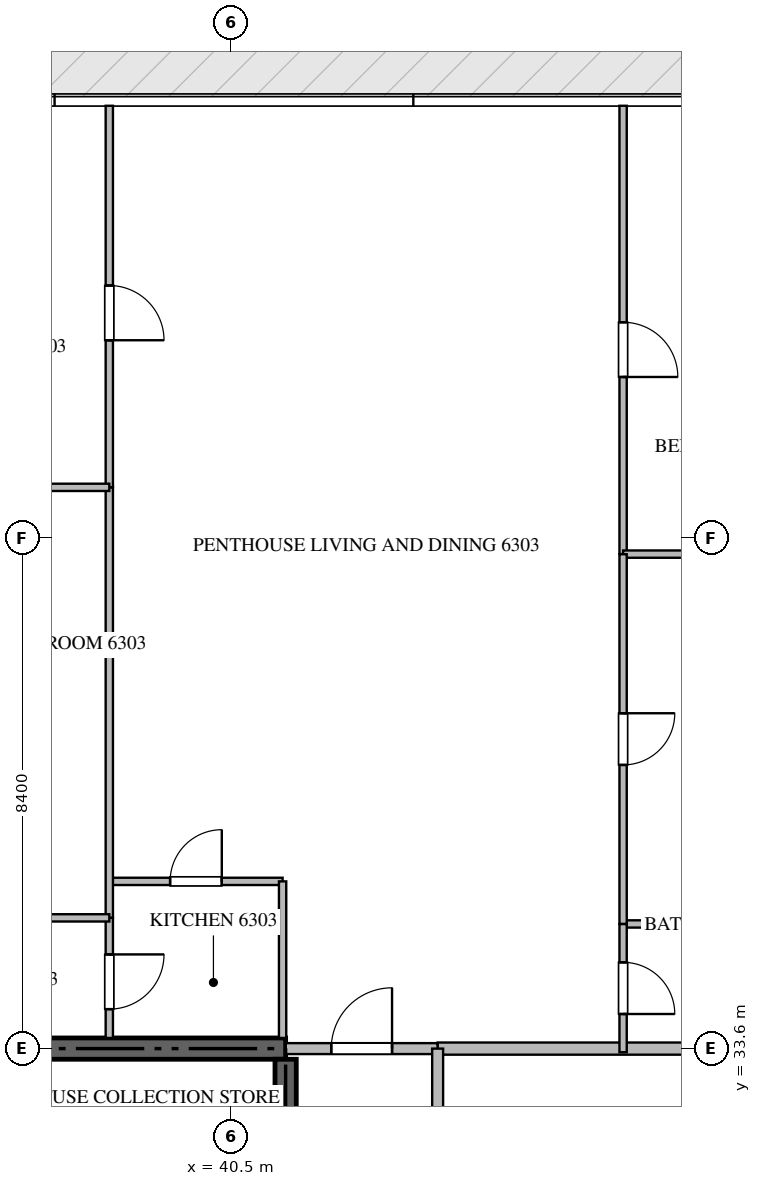
"""IFC4 building model, lengths in metres.
Left out: names, types, materials, properties, quantities, classifications, styles, units other than length and angle.
Written with IfcOpenShell. Run it as: python <this file> out.ifc"""

import sys

from ifc_helpers import new_model, si_unit, direction, frame, frame_2d, origin, place, context, subcontext, project, spatial, rectangle, extrude, source, transform, mapped, element, fill, save


model = new_model("IFC4")
c1 = context("Model", 3, precision=1e-05, world=origin(), true_north=direction((0.0, 1.0)))
c2 = subcontext(c1, "Body", "Model", "MODEL_VIEW")
j1 = project(units=[si_unit("LENGTHUNIT", "METRE"), si_unit("PLANEANGLEUNIT", "RADIAN")], contexts=[c1])
p1 = place(None, origin())
s1 = spatial("IfcSite", under=j1, at=p1, CompositionType="ELEMENT")
p2 = place(p1, origin())
s2 = spatial("IfcBuilding", under=s1, at=p2, CompositionType="ELEMENT")
p3 = place(p2, frame((0.0, 0.0, 252.8)))
s3 = spatial("IfcBuildingStorey", under=s2, at=p3, CompositionType="ELEMENT", Elevation=252.8)
p4 = place(p3, frame((41.4, 33.6, -0.26), z_axis=(0.0, 0.0, 1.0), x_axis=(-1.0, 0.0, 0.0)))
e1 = element("IfcWall", 1, at=p4, inside=s3, PredefinedType="SHEAR", context=c2, shape_type="SweptSolid", body=[
    extrude(rectangle(XDim=18.0, YDim=0.35, at=frame_2d((9.0, 0.0))), origin(), (0.0, 0.0, 1.0), 3.848),
])
p5 = place(p3, frame((41.4, 27.75, -0.26), z_axis=(0.0, 0.0, 1.0), x_axis=(0.0, 1.0, 0.0)))
e2 = element("IfcWall", 2, at=p5, inside=s3, PredefinedType="SHEAR", context=c2, shape_type="SweptSolid", body=[
    extrude(rectangle(XDim=5.675, YDim=0.35, at=frame_2d((2.837, 0.0))), origin(), (0.0, 0.0, 1.0), 3.848),
])
p6 = place(p3, frame((43.9, 33.6, 0.0), z_axis=(0.0, 0.0, 1.0), x_axis=(1.0, 0.0, 0.0)))
e3 = element("IfcWall", 3, at=p6, inside=s3, PredefinedType="PARTITIONING", context=c2, shape_type="SweptSolid", body=[
    extrude(rectangle(XDim=13.418, YDim=0.2, at=frame_2d((6.709, 0.0))), origin(), (0.0, 0.0, 1.0), 3.59),
])
p7 = place(p3, frame((41.402, 33.6, 0.0), z_axis=(0.0, 0.0, 1.0), x_axis=(1.0, 0.0, 0.0)))
e4 = element("IfcWall", 4, at=p7, inside=s3, PredefinedType="PARTITIONING", context=c2, shape_type="SweptSolid", body=[
    extrude(rectangle(XDim=2.496, YDim=0.18, at=frame_2d((1.248, 0.0))), origin(), (0.0, 0.0, 1.0), 3.59),
])
p8 = place(p7, frame((0.748, 0.0, 0.0)))
e5 = element("IfcOpeningElement", 5, at=p8, cuts=e4, PredefinedType="OPENING", context=c2, shape_type="SweptSolid", body=[
    extrude(rectangle(XDim=1.0, YDim=2.15, at=frame_2d((0.5, 1.075))), frame((0.0, 0.1, 0.0), z_axis=(0.0, -1.0, 0.0), x_axis=(1.0, 0.0, 0.0)), (0.0, 0.0, 1.0), 0.2),
])
p9 = place(p3, frame((43.9, 16.8, 0.0), z_axis=(0.0, 0.0, 1.0), x_axis=(0.0, 1.0, 0.0)))
e6 = element("IfcWall", 6, at=p9, inside=s3, PredefinedType="PARTITIONING", context=c2, shape_type="SweptSolid", body=[
    extrude(rectangle(XDim=16.8, YDim=0.18, at=frame_2d((8.4, 0.0))), origin(), (0.0, 0.0, 1.0), 3.59),
])
p10 = place(p9, frame((3.018, 0.0, 0.0)))
e7 = element("IfcOpeningElement", 7, at=p10, cuts=e6, PredefinedType="OPENING", context=c2, shape_type="SweptSolid", body=[
    extrude(rectangle(XDim=1.0, YDim=2.15, at=frame_2d((0.5, 1.075))), frame((0.0, 0.1, 0.0), z_axis=(0.0, -1.0, 0.0), x_axis=(1.0, 0.0, 0.0)), (0.0, 0.0, 1.0), 0.2),
])
p11 = place(p9, frame((9.18, 0.0, 0.0)))
e8 = element("IfcOpeningElement", 8, at=p11, cuts=e6, PredefinedType="OPENING", context=c2, shape_type="SweptSolid", body=[
    extrude(rectangle(XDim=1.0, YDim=2.15, at=frame_2d((0.5, 1.075))), frame((0.0, 0.1, 0.0), z_axis=(0.0, -1.0, 0.0), x_axis=(1.0, 0.0, 0.0)), (0.0, 0.0, 1.0), 0.2),
])
p12 = place(p9, frame((14.5, 0.0, 0.0)))
e9 = element("IfcOpeningElement", 9, at=p12, cuts=e6, PredefinedType="OPENING", context=c2, shape_type="SweptSolid", body=[
    extrude(rectangle(XDim=1.0, YDim=2.15, at=frame_2d((0.5, 1.075))), frame((0.0, 0.1, 0.0), z_axis=(0.0, -1.0, 0.0), x_axis=(1.0, 0.0, 0.0)), (0.0, 0.0, 1.0), 0.2),
])
p13 = place(p3, frame((38.5, 36.35, 0.0), z_axis=(0.0, 0.0, 1.0), x_axis=(1.0, 0.0, 0.0)))
e10 = element("IfcWall", 10, at=p13, inside=s3, PredefinedType="PARTITIONING", context=c2, shape_type="SweptSolid", body=[
    extrude(rectangle(XDim=2.85, YDim=0.12, at=frame_2d((1.425, 0.0))), origin(), (0.0, 0.0, 1.0), 3.59),
])
p14 = place(p13, frame((1.0, 0.0, 0.0)))
e11 = element("IfcOpeningElement", 11, at=p14, cuts=e10, PredefinedType="OPENING", context=c2, shape_type="SweptSolid", body=[
    extrude(rectangle(XDim=0.85, YDim=2.1, at=frame_2d((0.425, 1.05))), frame((0.0, 0.07, 0.0), z_axis=(0.0, -1.0, 0.0), x_axis=(1.0, 0.0, 0.0)), (0.0, 0.0, 1.0), 0.14),
])
p15 = place(p3, frame((41.35, 36.35, 0.0), z_axis=(0.0, 0.0, 1.0), x_axis=(0.0, -1.0, 0.0)))
e12 = element("IfcWall", 12, at=p15, inside=s3, PredefinedType="PARTITIONING", context=c2, shape_type="SweptSolid", body=[
    extrude(rectangle(XDim=2.575, YDim=0.12, at=frame_2d((1.288, 0.0))), origin(), (0.0, 0.0, 1.0), 3.59),
])
p16 = place(p3, frame((38.5, 35.75, 0.0), z_axis=(0.0, 0.0, 1.0), x_axis=(0.0, -1.0, 0.0)))
e13 = element("IfcWall", 13, at=p16, inside=s3, PredefinedType="PARTITIONING", context=c2, shape_type="SweptSolid", body=[
    extrude(rectangle(XDim=1.975, YDim=0.12, at=frame_2d((0.988, 0.0))), origin(), (0.0, 0.0, 1.0), 3.59),
])
p17 = place(p16, frame((0.601, 0.0, 0.0)))
e14 = element("IfcOpeningElement", 14, at=p17, cuts=e13, PredefinedType="OPENING", context=c2, shape_type="SweptSolid", body=[
    extrude(rectangle(XDim=0.9, YDim=2.1, at=frame_2d((0.45, 1.05))), frame((0.0, 0.07, 0.0), z_axis=(0.0, -1.0, 0.0), x_axis=(1.0, 0.0, 0.0)), (0.0, 0.0, 1.0), 0.14),
])
p18 = place(p3, frame((38.5, 49.105, 0.0), z_axis=(0.0, 0.0, 1.0), x_axis=(0.0, -1.0, 0.0)))
e15 = element("IfcWall", 15, at=p18, inside=s3, PredefinedType="PARTITIONING", context=c2, shape_type="SweptSolid", body=[
    extrude(rectangle(XDim=6.275, YDim=0.12, at=frame_2d((3.137, 0.0))), origin(), (0.0, 0.0, 1.0), 3.59),
])
p19 = place(p18, frame((2.956, 0.0, 0.0)))
e16 = element("IfcOpeningElement", 16, at=p19, cuts=e15, PredefinedType="OPENING", context=c2, shape_type="SweptSolid", body=[
    extrude(rectangle(XDim=0.9, YDim=2.1, at=frame_2d((0.45, 1.05))), frame((0.0, 0.07, 0.0), z_axis=(0.0, -1.0, 0.0), x_axis=(1.0, 0.0, 0.0)), (0.0, 0.0, 1.0), 0.14),
])
p20 = place(p3, frame((38.5, 42.828, 0.0), z_axis=(0.0, 0.0, 1.0), x_axis=(0.0, -1.0, 0.0)))
e17 = element("IfcWall", 17, at=p20, inside=s3, PredefinedType="PARTITIONING", context=c2, shape_type="SweptSolid", body=[
    extrude(rectangle(XDim=7.076, YDim=0.12, at=frame_2d((3.538, 0.0))), origin(), (0.0, 0.0, 1.0), 3.59),
])
p21 = place(p3, frame((33.35, 42.83, 0.0), z_axis=(0.0, 0.0, 1.0), x_axis=(1.0, 0.0, 0.0)))
e18 = element("IfcWall", 18, at=p21, inside=s3, PredefinedType="PARTITIONING", context=c2, shape_type="SweptSolid", body=[
    extrude(rectangle(XDim=5.15, YDim=0.12, at=frame_2d((2.575, 0.0))), origin(), (0.0, 0.0, 1.0), 3.59),
])
p22 = place(p3, frame((35.452, 35.75, 0.0), z_axis=(0.0, 0.0, 1.0), x_axis=(1.0, 0.0, 0.0)))
e19 = element("IfcWall", 19, at=p22, inside=s3, PredefinedType="PARTITIONING", context=c2, shape_type="SweptSolid", body=[
    extrude(rectangle(XDim=3.048, YDim=0.12, at=frame_2d((1.524, 0.0))), origin(), (0.0, 0.0, 1.0), 3.59),
])
p23 = place(p22, frame((1.099, 0.0, 0.0)))
e20 = element("IfcOpeningElement", 20, at=p23, cuts=e19, PredefinedType="OPENING", context=c2, shape_type="SweptSolid", body=[
    extrude(rectangle(XDim=0.85, YDim=2.1, at=frame_2d((0.425, 1.05))), frame((0.0, 0.07, 0.0), z_axis=(0.0, -1.0, 0.0), x_axis=(1.0, 0.0, 0.0)), (0.0, 0.0, 1.0), 0.14),
])
p24 = place(p3, frame((46.95, 49.105, 0.0), z_axis=(0.0, 0.0, 1.0), x_axis=(0.0, -1.0, 0.0)))
e21 = element("IfcWall", 21, at=p24, inside=s3, PredefinedType="PARTITIONING", context=c2, shape_type="SweptSolid", body=[
    extrude(rectangle(XDim=7.373, YDim=0.12, at=frame_2d((3.687, 0.0))), origin(), (0.0, 0.0, 1.0), 3.59),
])
p25 = place(p24, frame((3.56, 0.0, 0.0)))
e22 = element("IfcOpeningElement", 22, at=p25, cuts=e21, PredefinedType="OPENING", context=c2, shape_type="SweptSolid", body=[
    extrude(rectangle(XDim=0.9, YDim=2.1, at=frame_2d((0.45, 1.05))), frame((0.0, 0.07, 0.0), z_axis=(0.0, -1.0, 0.0), x_axis=(1.0, 0.0, 0.0)), (0.0, 0.0, 1.0), 0.14),
])
p26 = place(p3, frame((46.95, 41.732, 0.0), z_axis=(0.0, 0.0, 1.0), x_axis=(1.0, 0.0, 0.0)))
e23 = element("IfcWall", 23, at=p26, inside=s3, PredefinedType="PARTITIONING", context=c2, shape_type="SweptSolid", body=[
    extrude(rectangle(XDim=6.355, YDim=0.12, at=frame_2d((3.177, 0.0))), origin(), (0.0, 0.0, 1.0), 3.59),
])
p27 = place(p3, frame((46.95, 35.65, 0.0), z_axis=(0.0, 0.0, 1.0), x_axis=(1.0, 0.0, 0.0)))
e24 = element("IfcWall", 24, at=p27, inside=s3, PredefinedType="PARTITIONING", context=c2, shape_type="SweptSolid", body=[
    extrude(rectangle(XDim=3.2, YDim=0.12, at=frame_2d((1.6, 0.0))), origin(), (0.0, 0.0, 1.0), 3.59),
])
p28 = place(p3, frame((46.95, 41.73, 0.0), z_axis=(0.0, 0.0, 1.0), x_axis=(0.0, -1.0, 0.0)))
e25 = element("IfcWall", 25, at=p28, inside=s3, PredefinedType="PARTITIONING", context=c2, shape_type="SweptSolid", body=[
    extrude(rectangle(XDim=6.08, YDim=0.12, at=frame_2d((3.04, 0.0))), origin(), (0.0, 0.0, 1.0), 3.59),
])
p29 = place(p28, frame((2.615, 0.0, 0.0)))
e26 = element("IfcOpeningElement", 26, at=p29, cuts=e25, PredefinedType="OPENING", context=c2, shape_type="SweptSolid", body=[
    extrude(rectangle(XDim=0.85, YDim=2.1, at=frame_2d((0.425, 1.05))), frame((0.0, 0.07, 0.0), z_axis=(0.0, -1.0, 0.0), x_axis=(1.0, 0.0, 0.0)), (0.0, 0.0, 1.0), 0.14),
])
p30 = place(p3, frame((46.95, 35.648, 0.0), z_axis=(0.0, 0.0, 1.0), x_axis=(0.0, -1.0, 0.0)))
e27 = element("IfcWall", 27, at=p30, inside=s3, PredefinedType="PARTITIONING", context=c2, shape_type="SweptSolid", body=[
    extrude(rectangle(XDim=2.108, YDim=0.12, at=frame_2d((1.054, 0.0))), origin(), (0.0, 0.0, 1.0), 3.59),
])
p31 = place(p30, frame((0.629, 0.0, 0.0)))
e28 = element("IfcOpeningElement", 28, at=p31, cuts=e27, PredefinedType="OPENING", context=c2, shape_type="SweptSolid", body=[
    extrude(rectangle(XDim=0.85, YDim=2.1, at=frame_2d((0.425, 1.05))), frame((0.0, 0.07, 0.0), z_axis=(0.0, -1.0, 0.0), x_axis=(1.0, 0.0, 0.0)), (0.0, 0.0, 1.0), 0.14),
])
m1 = source(origin(), c2, "Body", "SweptSolid", [
    extrude(rectangle(XDim=1.0, YDim=2.15, at=frame_2d((0.5, 1.075))), frame((0.0, 0.025, 0.0), z_axis=(0.0, -1.0, 0.0), x_axis=(1.0, 0.0, 0.0)), (0.0, 0.0, 1.0), 0.05),
])
p32 = place(p8, origin())
e29 = element("IfcDoor", 29, at=p32, inside=s3, OperationType="SINGLE_SWING_RIGHT", PredefinedType="DOOR", context=c2, shape_type="MappedRepresentation", body=[
    mapped(m1, transform((0.0, 0.0, 0.0), scale=1.0)),
])
fill(e5, e29)
m2 = source(origin(), c2, "Body", "SweptSolid", [
    extrude(rectangle(XDim=0.85, YDim=2.1, at=frame_2d((0.425, 1.05))), frame((0.0, 0.025, 0.0), z_axis=(0.0, -1.0, 0.0), x_axis=(1.0, 0.0, 0.0)), (0.0, 0.0, 1.0), 0.05),
])
p33 = place(p14, origin())
e30 = element("IfcDoor", 30, at=p33, inside=s3, OperationType="SINGLE_SWING_RIGHT", PredefinedType="DOOR", context=c2, shape_type="MappedRepresentation", body=[
    mapped(m2, transform((0.0, 0.0, 0.0), scale=1.0)),
])
fill(e11, e30)
m3 = source(origin(), c2, "Body", "SweptSolid", [
    extrude(rectangle(XDim=0.9, YDim=2.1, at=frame_2d((0.45, 1.05))), frame((0.0, 0.025, 0.0), z_axis=(0.0, -1.0, 0.0), x_axis=(1.0, 0.0, 0.0)), (0.0, 0.0, 1.0), 0.05),
])
p34 = place(p17, origin())
e31 = element("IfcDoor", 31, at=p34, inside=s3, OperationType="SINGLE_SWING_LEFT", PredefinedType="DOOR", context=c2, shape_type="MappedRepresentation", body=[
    mapped(m3, transform((0.0, 0.0, 0.0), scale=1.0)),
])
fill(e14, e31)
p35 = place(p19, origin())
e32 = element("IfcDoor", 32, at=p35, inside=s3, OperationType="SINGLE_SWING_RIGHT", PredefinedType="DOOR", context=c2, shape_type="MappedRepresentation", body=[
    mapped(m3, transform((0.0, 0.0, 0.0), scale=1.0)),
])
fill(e16, e32)
p36 = place(p25, origin())
e33 = element("IfcDoor", 33, at=p36, inside=s3, OperationType="SINGLE_SWING_RIGHT", PredefinedType="DOOR", context=c2, shape_type="MappedRepresentation", body=[
    mapped(m3, transform((0.0, 0.0, 0.0), scale=1.0)),
])
fill(e22, e33)
p37 = place(p29, origin())
e34 = element("IfcDoor", 34, at=p37, inside=s3, OperationType="SINGLE_SWING_LEFT", PredefinedType="DOOR", context=c2, shape_type="MappedRepresentation", body=[
    mapped(m2, transform((0.0, 0.0, 0.0), scale=1.0)),
])
fill(e26, e34)
p38 = place(p31, origin())
e35 = element("IfcDoor", 35, at=p38, inside=s3, OperationType="SINGLE_SWING_RIGHT", PredefinedType="DOOR", context=c2, shape_type="MappedRepresentation", body=[
    mapped(m2, transform((0.0, 0.0, 0.0), scale=1.0)),
])
fill(e28, e35)
save(model, sys.argv[1])
